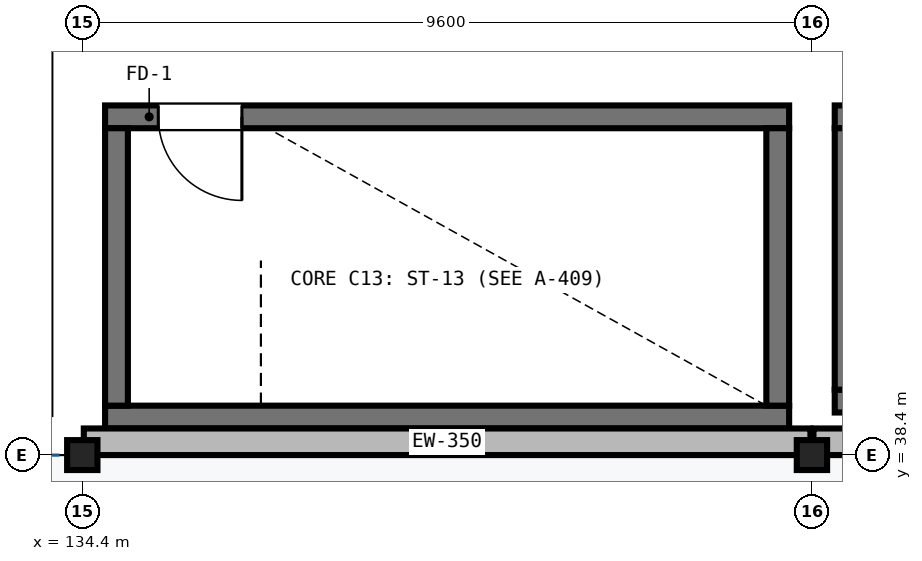
"""IFC4 building model, lengths in metres.
Left out: names, types, materials, properties, quantities, classifications, styles, units other than length and angle.
Written with IfcOpenShell. Run it as: python <this file> out.ifc"""

import sys

from ifc_helpers import new_model, si_unit, direction, frame, frame_2d, origin, origin_2d, place, context, subcontext, project, spatial, rectangle, i_section, extrude, element, fill, save


model = new_model("IFC4")
c1 = context("Model", 3, precision=1e-05, world=origin(), true_north=direction((0.0, 1.0)))
c2 = subcontext(c1, "Body", "Model", "MODEL_VIEW")
j1 = project(units=[si_unit("LENGTHUNIT", "METRE"), si_unit("PLANEANGLEUNIT", "RADIAN")], contexts=[c1])
p1 = place(None, origin())
s1 = spatial("IfcSite", under=j1, at=p1, CompositionType="ELEMENT")
p2 = place(p1, origin())
s2 = spatial("IfcBuilding", under=s1, at=p2, CompositionType="ELEMENT")
p3 = place(p2, origin())
s3 = spatial("IfcBuildingStorey", under=s2, at=p3, CompositionType="ELEMENT", Elevation=0.0)
for number, where, z_axis, x_axis in (
    (1, (134.4, 38.4, 0.0), (0.0, 0.0, 1.0), (1.0, 0.0, 0.0)),
    (2, (144.0, 38.4, 0.0), (0.0, 0.0, 1.0), (1.0, 0.0, 0.0)),
):
    element("IfcColumn", number, at=place(p3, frame(where, z_axis=z_axis, x_axis=x_axis)), inside=s3, PredefinedType="COLUMN", context=c2, shape_type="SweptSolid", body=[
        extrude(i_section(OverallWidth=0.399, OverallDepth=0.394, WebThickness=0.023, FlangeThickness=0.037, FilletRadius=0.015, at=origin_2d()), origin(), (0.0, 0.0, 1.0), 5.75),
    ])
p4 = place(p3, frame((144.3, 39.11, 0.0), z_axis=(0.0, 0.0, 1.0), x_axis=(1.0, 0.0, 0.0)))
e3 = element("IfcWall", 3, at=p4, inside=s3, PredefinedType="SHEAR", context=c2, shape_type="SweptSolid", body=[
    extrude(rectangle(XDim=9.0, YDim=0.3, at=frame_2d((4.5, 0.0))), origin(), (0.0, 0.0, 1.0), 5.75),
])
p5 = place(p3, frame((153.3, 42.85, 0.0), z_axis=(0.0, 0.0, 1.0), x_axis=(-1.0, 0.0, 0.0)))
e4 = element("IfcWall", 4, at=p5, inside=s3, PredefinedType="SHEAR", context=c2, shape_type="SweptSolid", body=[
    extrude(rectangle(XDim=9.0, YDim=0.3, at=frame_2d((4.5, 0.0))), origin(), (0.0, 0.0, 1.0), 5.75),
])
p6 = place(p5, frame((7.2, 0.0, 0.0)))
e5 = element("IfcOpeningElement", 5, at=p6, cuts=e4, PredefinedType="OPENING", context=c2, shape_type="SweptSolid", body=[
    extrude(rectangle(XDim=1.15, YDim=2.15, at=frame_2d((0.575, 1.075))), frame((0.0, 0.16, 0.0), z_axis=(0.0, -1.0, 0.0), x_axis=(1.0, 0.0, 0.0)), (0.0, 0.0, 1.0), 0.32),
])
p7 = place(p3, frame((144.45, 39.26, 0.0), z_axis=(0.0, 0.0, 1.0), x_axis=(0.0, 1.0, 0.0)))
e6 = element("IfcWall", 6, at=p7, inside=s3, PredefinedType="SHEAR", context=c2, shape_type="SweptSolid", body=[
    extrude(rectangle(XDim=3.44, YDim=0.3, at=frame_2d((1.72, 0.0))), origin(), (0.0, 0.0, 1.0), 5.75),
])
p8 = place(p3, frame((134.7, 38.9, 0.0), z_axis=(0.0, 0.0, 1.0), x_axis=(1.0, 0.0, 0.0)))
e7 = element("IfcWall", 7, at=p8, inside=s3, PredefinedType="SHEAR", context=c2, shape_type="SweptSolid", body=[
    extrude(rectangle(XDim=9.0, YDim=0.3, at=frame_2d((4.5, 0.0))), origin(), (0.0, 0.0, 1.0), 5.75),
])
p9 = place(p3, frame((143.7, 42.85, 0.0), z_axis=(0.0, 0.0, 1.0), x_axis=(-1.0, 0.0, 0.0)))
e8 = element("IfcWall", 8, at=p9, inside=s3, PredefinedType="SHEAR", context=c2, shape_type="SweptSolid", body=[
    extrude(rectangle(XDim=9.0, YDim=0.3, at=frame_2d((4.5, 0.0))), origin(), (0.0, 0.0, 1.0), 5.75),
])
p10 = place(p9, frame((7.2, 0.0, 0.0)))
e9 = element("IfcOpeningElement", 9, at=p10, cuts=e8, PredefinedType="OPENING", context=c2, shape_type="SweptSolid", body=[
    extrude(rectangle(XDim=1.1, YDim=2.15, at=frame_2d((0.55, 1.075))), frame((0.0, 0.16, 0.0), z_axis=(0.0, -1.0, 0.0), x_axis=(1.0, 0.0, 0.0)), (0.0, 0.0, 1.0), 0.32),
])
for number, where, z_axis, x_axis in (
    (10, (134.85, 39.05, 0.0), (0.0, 0.0, 1.0), (0.0, 1.0, 0.0)),
    (11, (143.55, 42.7, 0.0), (0.0, 0.0, 1.0), (0.0, -1.0, 0.0)),
):
    element("IfcWall", number, at=place(p3, frame(where, z_axis=z_axis, x_axis=x_axis)), inside=s3, PredefinedType="SHEAR", context=c2, shape_type="SweptSolid", body=[
        extrude(rectangle(XDim=3.65, YDim=0.3, at=frame_2d((1.825, 0.0))), origin(), (0.0, 0.0, 1.0), 5.75),
    ])
for number, where, z_axis, x_axis in (
    (12, (143.98, 38.575, 0.0), (0.0, 0.0, 1.0), (-1.0, 0.0, 0.0)),
    (13, (153.58, 38.575, 0.0), (0.0, 0.0, 1.0), (-1.0, 0.0, 0.0)),
):
    element("IfcWall", number, at=place(p3, frame(where, z_axis=z_axis, x_axis=x_axis)), inside=s3, PredefinedType="SOLIDWALL", context=c2, shape_type="SweptSolid", body=[
        extrude(rectangle(XDim=9.56, YDim=0.35, at=frame_2d((4.78, 0.0))), origin(), (0.0, 0.0, 1.0), 5.4),
    ])
p11 = place(p10, origin())
e14 = element("IfcDoor", 14, at=p11, inside=s3, OperationType="SINGLE_SWING_LEFT", PredefinedType="DOOR", context=c2, shape_type="SweptSolid", body=[
    extrude(rectangle(XDim=1.1, YDim=2.15, at=frame_2d((0.55, 1.075))), frame((0.0, 0.025, 0.0), z_axis=(0.0, -1.0, 0.0), x_axis=(1.0, 0.0, 0.0)), (0.0, 0.0, 1.0), 0.05),
])
fill(e9, e14)
save(model, sys.argv[1])
